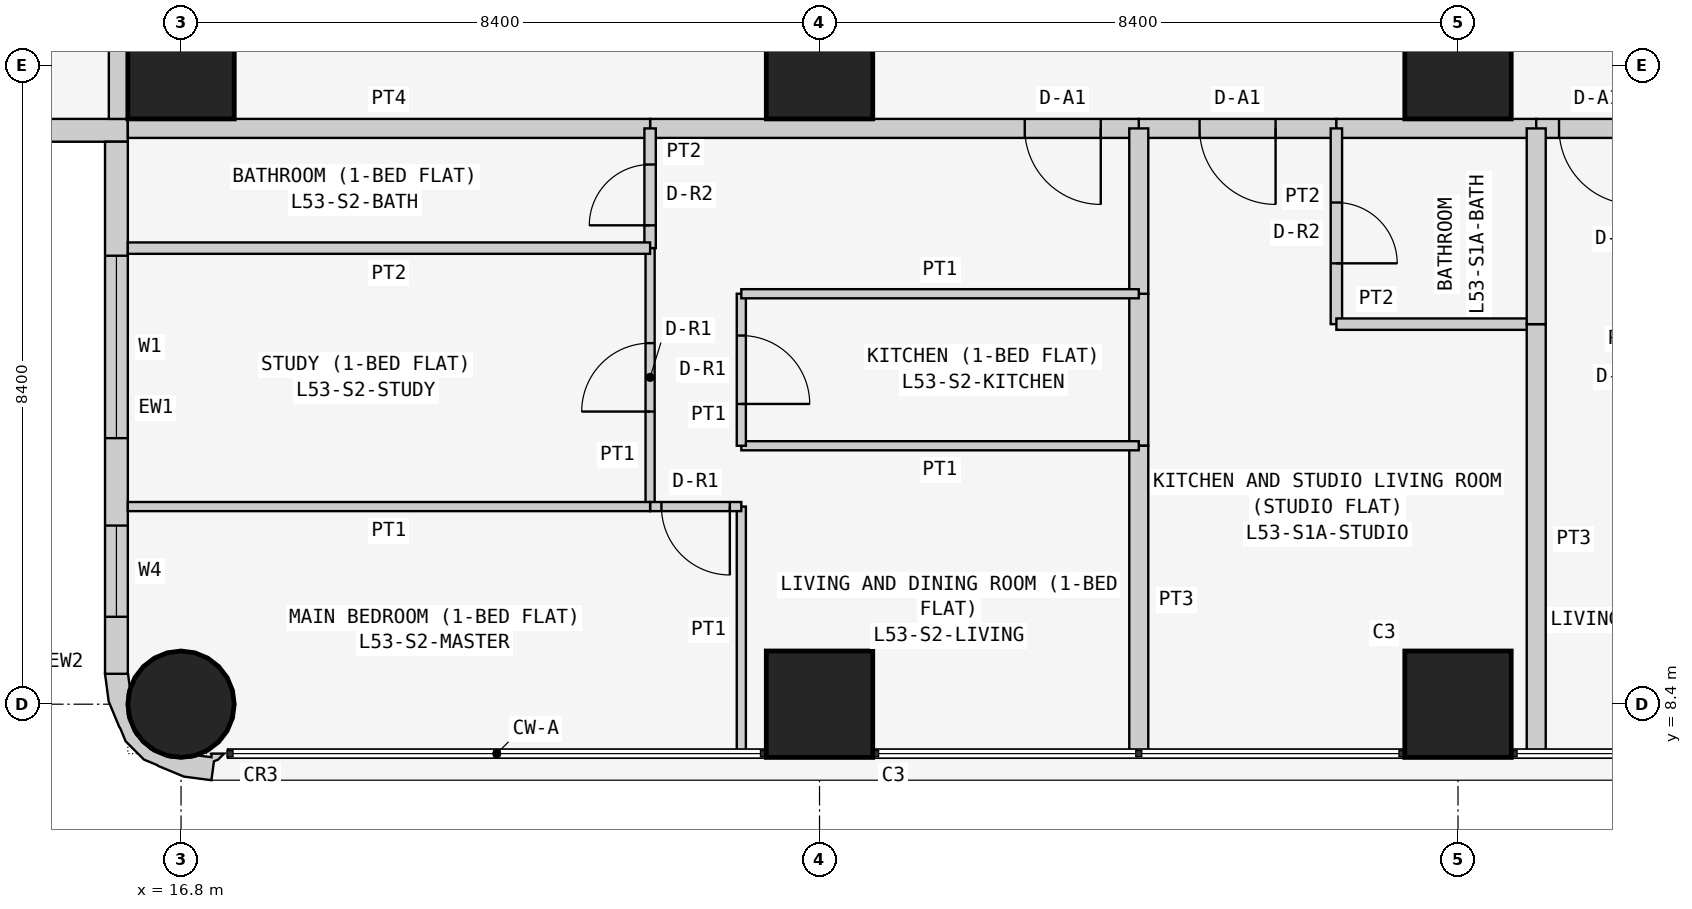
"""IFC4 building model, lengths in metres.
Left out: names, types, materials, properties, quantities, classifications, styles, units other than length and angle.
Written with IfcOpenShell. Run it as: python <this file> out.ifc"""

import sys

from ifc_helpers import new_model, si_unit, direction, frame, frame_2d, origin, origin_2d, place, context, subcontext, project, spatial, polyline, rectangle, circle, outline, extrude, element, fill, save


model = new_model("IFC4")
c1 = context("Model", 3, precision=1e-05, world=origin(), true_north=direction((0.0, 1.0)))
c2 = subcontext(c1, "Body", "Model", "MODEL_VIEW")
j1 = project(units=[si_unit("LENGTHUNIT", "METRE"), si_unit("PLANEANGLEUNIT", "RADIAN")], contexts=[c1])
p1 = place(None, origin())
s1 = spatial("IfcSite", under=j1, at=p1, CompositionType="ELEMENT")
p2 = place(p1, origin())
s2 = spatial("IfcBuilding", under=s1, at=p2, CompositionType="ELEMENT")
p3 = place(p2, frame((0.0, 0.0, 204.9)))
s3 = spatial("IfcBuildingStorey", under=s2, at=p3, CompositionType="ELEMENT", Elevation=204.9)
p4 = place(p3, frame((16.8, 8.4, 0.0), z_axis=(0.0, 0.0, 1.0), x_axis=(1.0, 0.0, 0.0)))
e1 = element("IfcColumn", 1, at=p4, inside=s3, PredefinedType="COLUMN", context=c2, shape_type="SweptSolid", body=[
    extrude(circle(Radius=0.7, at=origin_2d()), origin(), (0.0, 0.0, 1.0), 3.6),
])
for number, where, z_axis, x_axis in (
    (2, (16.8, 16.8, 0.0), (0.0, 0.0, 1.0), (1.0, 0.0, 0.0)),
    (3, (25.2, 8.4, 0.0), (0.0, 0.0, 1.0), (1.0, 0.0, 0.0)),
    (4, (25.2, 16.8, 0.0), (0.0, 0.0, 1.0), (1.0, 0.0, 0.0)),
    (5, (33.6, 8.4, 0.0), (0.0, 0.0, 1.0), (1.0, 0.0, 0.0)),
    (6, (33.6, 16.8, 0.0), (0.0, 0.0, 1.0), (1.0, 0.0, 0.0)),
):
    element("IfcColumn", number, at=place(p3, frame(where, z_axis=z_axis, x_axis=x_axis)), inside=s3, PredefinedType="COLUMN", context=c2, shape_type="SweptSolid", body=[
        extrude(rectangle(XDim=1.4, YDim=1.4, at=origin_2d()), origin(), (0.0, 0.0, 1.0), 3.6),
    ])
p5 = place(p3, frame((0.4, 15.95, 0.0), z_axis=(0.0, 0.0, 1.0), x_axis=(1.0, 0.0, 0.0)))
e7 = element("IfcWall", 7, at=p5, inside=s3, PredefinedType="SOLIDWALL", context=c2, shape_type="SweptSolid", body=[
    extrude(rectangle(XDim=15.7, YDim=0.3, at=frame_2d((7.85, 0.0))), origin(), (0.0, 0.0, 1.0), 3.45),
])
p6 = place(p5, frame((12.4, 0.0, 0.9)))
e8 = element("IfcOpeningElement", 8, at=p6, cuts=e7, PredefinedType="OPENING", context=c2, shape_type="SweptSolid", body=[
    extrude(rectangle(XDim=1.8, YDim=1.5, at=frame_2d((0.9, 0.75))), frame((0.0, 0.16, 0.0), z_axis=(0.0, -1.0, 0.0), x_axis=(1.0, 0.0, 0.0)), (0.0, 0.0, 1.0), 0.32),
])
p7 = place(p5, frame((9.55, 0.0, 1.5)))
e9 = element("IfcOpeningElement", 9, at=p7, cuts=e7, PredefinedType="OPENING", context=c2, shape_type="SweptSolid", body=[
    extrude(rectangle(XDim=0.9, YDim=0.7, at=frame_2d((0.45, 0.35))), frame((0.0, 0.16, 0.0), z_axis=(0.0, -1.0, 0.0), x_axis=(1.0, 0.0, 0.0)), (0.0, 0.0, 1.0), 0.32),
])
p8 = place(p5, frame((5.1, 0.0, 0.9)))
e10 = element("IfcOpeningElement", 10, at=p8, cuts=e7, PredefinedType="OPENING", context=c2, shape_type="SweptSolid", body=[
    extrude(rectangle(XDim=1.8, YDim=1.5, at=frame_2d((0.9, 0.75))), frame((0.0, 0.16, 0.0), z_axis=(0.0, -1.0, 0.0), x_axis=(1.0, 0.0, 0.0)), (0.0, 0.0, 1.0), 0.32),
])
p9 = place(p5, frame((2.0, 0.0, 0.0)))
e11 = element("IfcOpeningElement", 11, at=p9, cuts=e7, PredefinedType="OPENING", context=c2, shape_type="SweptSolid", body=[
    extrude(rectangle(XDim=0.9, YDim=2.4, at=frame_2d((0.45, 1.2))), frame((0.0, 0.16, 0.0), z_axis=(0.0, -1.0, 0.0), x_axis=(1.0, 0.0, 0.0)), (0.0, 0.0, 1.0), 0.32),
])
p10 = place(p5, frame((0.7, 0.0, 0.9)))
e12 = element("IfcOpeningElement", 12, at=p10, cuts=e7, PredefinedType="OPENING", context=c2, shape_type="SweptSolid", body=[
    extrude(rectangle(XDim=1.2, YDim=1.5, at=frame_2d((0.6, 0.75))), frame((0.0, 0.16, 0.0), z_axis=(0.0, -1.0, 0.0), x_axis=(1.0, 0.0, 0.0)), (0.0, 0.0, 1.0), 0.32),
])
p11 = place(p3, frame((15.95, 15.8, 0.0), z_axis=(0.0, 0.0, 1.0), x_axis=(0.0, -1.0, 0.0)))
e13 = element("IfcWall", 13, at=p11, inside=s3, PredefinedType="SOLIDWALL", context=c2, shape_type="SweptSolid", body=[
    extrude(rectangle(XDim=7.0, YDim=0.3, at=frame_2d((3.5, 0.0))), origin(), (0.0, 0.0, 1.0), 3.45),
])
p12 = place(p11, frame((1.5, 0.0, 0.9)))
e14 = element("IfcOpeningElement", 14, at=p12, cuts=e13, PredefinedType="OPENING", context=c2, shape_type="SweptSolid", body=[
    extrude(rectangle(XDim=2.4, YDim=1.5, at=frame_2d((1.2, 0.75))), frame((0.0, 0.16, 0.0), z_axis=(0.0, -1.0, 0.0), x_axis=(1.0, 0.0, 0.0)), (0.0, 0.0, 1.0), 0.32),
])
p13 = place(p11, frame((5.05, 0.0, 0.9)))
e15 = element("IfcOpeningElement", 15, at=p13, cuts=e13, PredefinedType="OPENING", context=c2, shape_type="SweptSolid", body=[
    extrude(rectangle(XDim=1.2, YDim=1.5, at=frame_2d((0.6, 0.75))), frame((0.0, 0.16, 0.0), z_axis=(0.0, -1.0, 0.0), x_axis=(1.0, 0.0, 0.0)), (0.0, 0.0, 1.0), 0.32),
])
p14 = place(p3, frame((16.076, 8.69, 0.0), z_axis=(0.0, 0.0, 1.0), x_axis=(-0.439933741929, -0.898030234854, 0.0)))
e16 = element("IfcWall", 16, at=p14, inside=s3, PredefinedType="SOLIDWALL", context=c2, shape_type="SweptSolid", body=[
    extrude(outline(polyline([(0.664, 1.577), (0.426, 1.497), (0.382, 1.536), (0.276, 1.572), (0.349, 1.423), (0.392, 1.444), (0.453, 1.261), (0.51, 1.211), (0.632, 0.961), (0.65, 0.683), (0.56, 0.419), (0.375, 0.21), (0.125, 0.087), (0.05, 0.082), (-0.127, -0.035), (-0.145, -0.044), (0.022, -0.296), (0.327, -0.094), (0.568, 0.18), (0.578, 0.199), (0.7, 0.337), (0.811, 0.661), (0.799, 0.846), (0.803, 0.866), (0.78, 1.231), (0.664, 1.577)])), origin(), (0.0, 0.0, 1.0), 3.45),
])
p15 = place(p3, frame((32.0, 15.975, 0.0), z_axis=(0.0, 0.0, 1.0), x_axis=(-1.0, 0.0, 0.0)))
e17 = element("IfcWall", 17, at=p15, inside=s3, PredefinedType="PARTITIONING", context=c2, shape_type="SweptSolid", body=[
    extrude(rectangle(XDim=2.6, YDim=0.25, at=frame_2d((1.3, 0.0))), origin(), (0.0, 0.0, 1.0), 3.45),
])
p16 = place(p15, frame((0.8, 0.0, 0.0)))
e18 = element("IfcOpeningElement", 18, at=p16, cuts=e17, PredefinedType="OPENING", context=c2, shape_type="SweptSolid", body=[
    extrude(rectangle(XDim=1.0, YDim=2.1, at=frame_2d((0.5, 1.05))), frame((0.0, 0.135, 0.0), z_axis=(0.0, -1.0, 0.0), x_axis=(1.0, 0.0, 0.0)), (0.0, 0.0, 1.0), 0.27),
])
p17 = place(p3, frame((34.629, 15.975, 0.0), z_axis=(0.0, 0.0, 1.0), x_axis=(-1.0, 0.0, 0.0)))
e19 = element("IfcWall", 19, at=p17, inside=s3, PredefinedType="PARTITIONING", context=c2, shape_type="SweptSolid", body=[
    extrude(rectangle(XDim=2.629, YDim=0.25, at=frame_2d((1.314, 0.0))), origin(), (0.0, 0.0, 1.0), 3.45),
])
p18 = place(p3, frame((36.229, 15.975, 0.0), z_axis=(0.0, 0.0, 1.0), x_axis=(-1.0, 0.0, 0.0)))
e20 = element("IfcWall", 20, at=p18, inside=s3, PredefinedType="PARTITIONING", context=c2, shape_type="SweptSolid", body=[
    extrude(rectangle(XDim=1.6, YDim=0.25, at=frame_2d((0.8, 0.0))), origin(), (0.0, 0.0, 1.0), 3.45),
])
p19 = place(p18, frame((0.3, 0.0, 0.0)))
e21 = element("IfcOpeningElement", 21, at=p19, cuts=e20, PredefinedType="OPENING", context=c2, shape_type="SweptSolid", body=[
    extrude(rectangle(XDim=1.0, YDim=2.1, at=frame_2d((0.5, 1.05))), frame((0.0, 0.135, 0.0), z_axis=(0.0, -1.0, 0.0), x_axis=(1.0, 0.0, 0.0)), (0.0, 0.0, 1.0), 0.27),
])
p20 = place(p3, frame((29.4, 15.975, 0.0), z_axis=(0.0, 0.0, 1.0), x_axis=(-1.0, 0.0, 0.0)))
e22 = element("IfcWall", 22, at=p20, inside=s3, PredefinedType="PARTITIONING", context=c2, shape_type="SweptSolid", body=[
    extrude(rectangle(XDim=6.429, YDim=0.25, at=frame_2d((3.214, 0.0))), origin(), (0.0, 0.0, 1.0), 3.45),
])
p21 = place(p20, frame((0.5, 0.0, 0.0)))
e23 = element("IfcOpeningElement", 23, at=p21, cuts=e22, PredefinedType="OPENING", context=c2, shape_type="SweptSolid", body=[
    extrude(rectangle(XDim=1.0, YDim=2.1, at=frame_2d((0.5, 1.05))), frame((0.0, 0.135, 0.0), z_axis=(0.0, -1.0, 0.0), x_axis=(1.0, 0.0, 0.0)), (0.0, 0.0, 1.0), 0.27),
])
for number, where, z_axis, x_axis in (
    (24, (22.971, 15.975, 0.0), (0.0, 0.0, 1.0), (-1.0, 0.0, 0.0)),
    (25, (15.975, 16.1, 0.0), (0.0, 0.0, 1.0), (0.0, 1.0, 0.0)),
):
    element("IfcWall", number, at=place(p3, frame(where, z_axis=z_axis, x_axis=x_axis)), inside=s3, PredefinedType="PARTITIONING", context=c2, shape_type="SweptSolid", body=[
        extrude(rectangle(XDim=6.871, YDim=0.25, at=frame_2d((3.436, 0.0))), origin(), (0.0, 0.0, 1.0), 3.45),
    ])
p22 = place(p3, frame((32.0, 15.975, 0.0), z_axis=(0.0, 0.0, 1.0), x_axis=(0.0, -1.0, 0.0)))
e26 = element("IfcWall", 26, at=p22, inside=s3, PredefinedType="PARTITIONING", context=c2, shape_type="SweptSolid", body=[
    extrude(rectangle(XDim=2.575, YDim=0.15, at=frame_2d((1.288, 0.0))), origin(), (0.0, 0.0, 1.0), 3.45),
])
p23 = place(p22, frame((0.975, 0.0, 0.0)))
e27 = element("IfcOpeningElement", 27, at=p23, cuts=e26, PredefinedType="OPENING", context=c2, shape_type="SweptSolid", body=[
    extrude(rectangle(XDim=0.8, YDim=2.1, at=frame_2d((0.4, 1.05))), frame((0.0, 0.085, 0.0), z_axis=(0.0, -1.0, 0.0), x_axis=(1.0, 0.0, 0.0)), (0.0, 0.0, 1.0), 0.17),
])
p24 = place(p3, frame((32.0, 13.4, 0.0), z_axis=(0.0, 0.0, 1.0), x_axis=(1.0, 0.0, 0.0)))
e28 = element("IfcWall", 28, at=p24, inside=s3, PredefinedType="PARTITIONING", context=c2, shape_type="SweptSolid", body=[
    extrude(rectangle(XDim=2.629, YDim=0.15, at=frame_2d((1.314, 0.0))), origin(), (0.0, 0.0, 1.0), 3.45),
])
p25 = place(p3, frame((34.629, 13.4, 0.0), z_axis=(0.0, 0.0, 1.0), x_axis=(0.0, -1.0, 0.0)))
e29 = element("IfcWall", 29, at=p25, inside=s3, PredefinedType="PARTITIONING", context=c2, shape_type="SweptSolid", body=[
    extrude(rectangle(XDim=5.65, YDim=0.25, at=frame_2d((2.825, 0.0))), origin(), (0.0, 0.0, 1.0), 3.45),
])
p26 = place(p3, frame((29.4, 11.8, 0.0), z_axis=(0.0, 0.0, 1.0), x_axis=(0.0, 1.0, 0.0)))
e30 = element("IfcWall", 30, at=p26, inside=s3, PredefinedType="PARTITIONING", context=c2, shape_type="SweptSolid", body=[
    extrude(rectangle(XDim=2.0, YDim=0.25, at=frame_2d((1.0, 0.0))), origin(), (0.0, 0.0, 1.0), 2.848),
])
p27 = place(p3, frame((29.4, 7.75, 0.0), z_axis=(0.0, 0.0, 1.0), x_axis=(0.0, 1.0, 0.0)))
e31 = element("IfcWall", 31, at=p27, inside=s3, PredefinedType="PARTITIONING", context=c2, shape_type="SweptSolid", body=[
    extrude(rectangle(XDim=4.05, YDim=0.25, at=frame_2d((2.025, 0.0))), origin(), (0.0, 0.0, 1.0), 2.848),
])
p28 = place(p3, frame((29.4, 13.8, 0.0), z_axis=(0.0, 0.0, 1.0), x_axis=(0.0, 1.0, 0.0)))
e32 = element("IfcWall", 32, at=p28, inside=s3, PredefinedType="PARTITIONING", context=c2, shape_type="SweptSolid", body=[
    extrude(rectangle(XDim=2.175, YDim=0.25, at=frame_2d((1.087, 0.0))), origin(), (0.0, 0.0, 1.0), 2.848),
])
p29 = place(p3, frame((34.629, 13.4, 0.0), z_axis=(0.0, 0.0, 1.0), x_axis=(0.0, 1.0, 0.0)))
e33 = element("IfcWall", 33, at=p29, inside=s3, PredefinedType="PARTITIONING", context=c2, shape_type="SweptSolid", body=[
    extrude(rectangle(XDim=2.575, YDim=0.25, at=frame_2d((1.288, 0.0))), origin(), (0.0, 0.0, 1.0), 3.45),
])
p30 = place(p3, frame((29.4, 11.8, 0.0), z_axis=(0.0, 0.0, 1.0), x_axis=(-1.0, 0.0, 0.0)))
e34 = element("IfcWall", 34, at=p30, inside=s3, PredefinedType="PARTITIONING", context=c2, shape_type="SweptSolid", body=[
    extrude(rectangle(XDim=5.229, YDim=0.12, at=frame_2d((2.615, 0.0))), origin(), (0.0, 0.0, 1.0), 3.45),
])
p31 = place(p3, frame((24.171, 11.8, 0.0), z_axis=(0.0, 0.0, 1.0), x_axis=(0.0, 1.0, 0.0)))
e35 = element("IfcWall", 35, at=p31, inside=s3, PredefinedType="PARTITIONING", context=c2, shape_type="SweptSolid", body=[
    extrude(rectangle(XDim=2.0, YDim=0.12, at=frame_2d((1.0, 0.0))), origin(), (0.0, 0.0, 1.0), 3.45),
])
p32 = place(p31, frame((0.55, 0.0, 0.0)))
e36 = element("IfcOpeningElement", 36, at=p32, cuts=e35, PredefinedType="OPENING", context=c2, shape_type="SweptSolid", body=[
    extrude(rectangle(XDim=0.9, YDim=2.1, at=frame_2d((0.45, 1.05))), frame((0.0, 0.07, 0.0), z_axis=(0.0, -1.0, 0.0), x_axis=(1.0, 0.0, 0.0)), (0.0, 0.0, 1.0), 0.14),
])
p33 = place(p3, frame((24.171, 13.8, 0.0), z_axis=(0.0, 0.0, 1.0), x_axis=(1.0, 0.0, 0.0)))
e37 = element("IfcWall", 37, at=p33, inside=s3, PredefinedType="PARTITIONING", context=c2, shape_type="SweptSolid", body=[
    extrude(rectangle(XDim=5.229, YDim=0.12, at=frame_2d((2.615, 0.0))), origin(), (0.0, 0.0, 1.0), 3.45),
])
p34 = place(p3, frame((22.971, 14.4, 0.0), z_axis=(0.0, 0.0, 1.0), x_axis=(0.0, 1.0, 0.0)))
e38 = element("IfcWall", 38, at=p34, inside=s3, PredefinedType="PARTITIONING", context=c2, shape_type="SweptSolid", body=[
    extrude(rectangle(XDim=1.575, YDim=0.15, at=frame_2d((0.788, 0.0))), origin(), (0.0, 0.0, 1.0), 3.45),
])
p35 = place(p34, frame((0.3, 0.0, 0.0)))
e39 = element("IfcOpeningElement", 39, at=p35, cuts=e38, PredefinedType="OPENING", context=c2, shape_type="SweptSolid", body=[
    extrude(rectangle(XDim=0.8, YDim=2.1, at=frame_2d((0.4, 1.05))), frame((0.0, 0.085, 0.0), z_axis=(0.0, -1.0, 0.0), x_axis=(1.0, 0.0, 0.0)), (0.0, 0.0, 1.0), 0.17),
])
p36 = place(p3, frame((22.971, 11.0, 0.0), z_axis=(0.0, 0.0, 1.0), x_axis=(0.0, 1.0, 0.0)))
e40 = element("IfcWall", 40, at=p36, inside=s3, PredefinedType="PARTITIONING", context=c2, shape_type="SweptSolid", body=[
    extrude(rectangle(XDim=3.4, YDim=0.12, at=frame_2d((1.7, 0.0))), origin(), (0.0, 0.0, 1.0), 3.45),
])
p37 = place(p36, frame((1.25, 0.0, 0.0)))
e41 = element("IfcOpeningElement", 41, at=p37, cuts=e40, PredefinedType="OPENING", context=c2, shape_type="SweptSolid", body=[
    extrude(rectangle(XDim=0.9, YDim=2.1, at=frame_2d((0.45, 1.05))), frame((0.0, 0.07, 0.0), z_axis=(0.0, -1.0, 0.0), x_axis=(1.0, 0.0, 0.0)), (0.0, 0.0, 1.0), 0.14),
])
p38 = place(p3, frame((24.171, 7.75, 0.0), z_axis=(0.0, 0.0, 1.0), x_axis=(0.0, 1.0, 0.0)))
e42 = element("IfcWall", 42, at=p38, inside=s3, PredefinedType="PARTITIONING", context=c2, shape_type="SweptSolid", body=[
    extrude(rectangle(XDim=3.25, YDim=0.12, at=frame_2d((1.625, 0.0))), origin(), (0.0, 0.0, 1.0), 3.45),
])
p39 = place(p3, frame((24.171, 11.0, 0.0), z_axis=(0.0, 0.0, 1.0), x_axis=(-1.0, 0.0, 0.0)))
e43 = element("IfcWall", 43, at=p39, inside=s3, PredefinedType="PARTITIONING", context=c2, shape_type="SweptSolid", body=[
    extrude(rectangle(XDim=1.2, YDim=0.12, at=frame_2d((0.6, 0.0))), origin(), (0.0, 0.0, 1.0), 3.45),
])
p40 = place(p39, frame((0.151, 0.0, 0.0)))
e44 = element("IfcOpeningElement", 44, at=p40, cuts=e43, PredefinedType="OPENING", context=c2, shape_type="SweptSolid", body=[
    extrude(rectangle(XDim=0.9, YDim=2.1, at=frame_2d((0.45, 1.05))), frame((0.0, 0.07, 0.0), z_axis=(0.0, -1.0, 0.0), x_axis=(1.0, 0.0, 0.0)), (0.0, 0.0, 1.0), 0.14),
])
p41 = place(p3, frame((22.971, 14.4, 0.0), z_axis=(0.0, 0.0, 1.0), x_axis=(-1.0, 0.0, 0.0)))
e45 = element("IfcWall", 45, at=p41, inside=s3, PredefinedType="PARTITIONING", context=c2, shape_type="SweptSolid", body=[
    extrude(rectangle(XDim=6.871, YDim=0.15, at=frame_2d((3.436, 0.0))), origin(), (0.0, 0.0, 1.0), 3.45),
])
p42 = place(p3, frame((22.971, 11.0, 0.0), z_axis=(0.0, 0.0, 1.0), x_axis=(-1.0, 0.0, 0.0)))
e46 = element("IfcWall", 46, at=p42, inside=s3, PredefinedType="PARTITIONING", context=c2, shape_type="SweptSolid", body=[
    extrude(rectangle(XDim=6.871, YDim=0.12, at=frame_2d((3.436, 0.0))), origin(), (0.0, 0.0, 1.0), 3.45),
])
p43 = place(p12, origin())
e47 = element("IfcWindow", 47, at=p43, inside=s3, PartitioningType="SINGLE_PANEL", PredefinedType="WINDOW", context=c2, shape_type="SweptSolid", body=[
    extrude(rectangle(XDim=2.4, YDim=1.5, at=frame_2d((1.2, 0.75))), frame((0.0, 0.03, 0.0), z_axis=(0.0, -1.0, 0.0), x_axis=(1.0, 0.0, 0.0)), (0.0, 0.0, 1.0), 0.06),
])
fill(e14, e47)
p44 = place(p13, origin())
e48 = element("IfcWindow", 48, at=p44, inside=s3, PartitioningType="SINGLE_PANEL", PredefinedType="WINDOW", context=c2, shape_type="SweptSolid", body=[
    extrude(rectangle(XDim=1.2, YDim=1.5, at=frame_2d((0.6, 0.75))), frame((0.0, 0.03, 0.0), z_axis=(0.0, -1.0, 0.0), x_axis=(1.0, 0.0, 0.0)), (0.0, 0.0, 1.0), 0.06),
])
fill(e15, e48)
p45 = place(p16, origin())
e49 = element("IfcDoor", 49, at=p45, inside=s3, OperationType="SINGLE_SWING_LEFT", PredefinedType="DOOR", context=c2, shape_type="SweptSolid", body=[
    extrude(rectangle(XDim=1.0, YDim=2.1, at=frame_2d((0.5, 1.05))), frame((0.0, 0.025, 0.0), z_axis=(0.0, -1.0, 0.0), x_axis=(1.0, 0.0, 0.0)), (0.0, 0.0, 1.0), 0.05),
])
fill(e18, e49)
p46 = place(p23, origin())
e50 = element("IfcDoor", 50, at=p46, inside=s3, OperationType="SINGLE_SWING_RIGHT", PredefinedType="DOOR", context=c2, shape_type="SweptSolid", body=[
    extrude(rectangle(XDim=0.8, YDim=2.1, at=frame_2d((0.4, 1.05))), frame((0.0, 0.025, 0.0), z_axis=(0.0, -1.0, 0.0), x_axis=(1.0, 0.0, 0.0)), (0.0, 0.0, 1.0), 0.05),
])
fill(e27, e50)
p47 = place(p19, origin())
e51 = element("IfcDoor", 51, at=p47, inside=s3, OperationType="SINGLE_SWING_LEFT", PredefinedType="DOOR", context=c2, shape_type="SweptSolid", body=[
    extrude(rectangle(XDim=1.0, YDim=2.1, at=frame_2d((0.5, 1.05))), frame((0.0, 0.025, 0.0), z_axis=(0.0, -1.0, 0.0), x_axis=(1.0, 0.0, 0.0)), (0.0, 0.0, 1.0), 0.05),
])
fill(e21, e51)
p48 = place(p21, origin())
e52 = element("IfcDoor", 52, at=p48, inside=s3, OperationType="SINGLE_SWING_LEFT", PredefinedType="DOOR", context=c2, shape_type="SweptSolid", body=[
    extrude(rectangle(XDim=1.0, YDim=2.1, at=frame_2d((0.5, 1.05))), frame((0.0, 0.025, 0.0), z_axis=(0.0, -1.0, 0.0), x_axis=(1.0, 0.0, 0.0)), (0.0, 0.0, 1.0), 0.05),
])
fill(e23, e52)
p49 = place(p32, frame((0.9, 0.0, 0.0), z_axis=(0.0, 0.0, 1.0), x_axis=(-1.0, 0.0, 0.0)))
e53 = element("IfcDoor", 53, at=p49, inside=s3, OperationType="SINGLE_SWING_RIGHT", PredefinedType="DOOR", context=c2, shape_type="SweptSolid", body=[
    extrude(rectangle(XDim=0.9, YDim=2.1, at=frame_2d((0.45, 1.05))), frame((0.0, 0.025, 0.0), z_axis=(0.0, -1.0, 0.0), x_axis=(1.0, 0.0, 0.0)), (0.0, 0.0, 1.0), 0.05),
])
fill(e36, e53)
p50 = place(p35, origin())
e54 = element("IfcDoor", 54, at=p50, inside=s3, OperationType="SINGLE_SWING_LEFT", PredefinedType="DOOR", context=c2, shape_type="SweptSolid", body=[
    extrude(rectangle(XDim=0.8, YDim=2.1, at=frame_2d((0.4, 1.05))), frame((0.0, 0.025, 0.0), z_axis=(0.0, -1.0, 0.0), x_axis=(1.0, 0.0, 0.0)), (0.0, 0.0, 1.0), 0.05),
])
fill(e39, e54)
p51 = place(p37, origin())
e55 = element("IfcDoor", 55, at=p51, inside=s3, OperationType="SINGLE_SWING_LEFT", PredefinedType="DOOR", context=c2, shape_type="SweptSolid", body=[
    extrude(rectangle(XDim=0.9, YDim=2.1, at=frame_2d((0.45, 1.05))), frame((0.0, 0.025, 0.0), z_axis=(0.0, -1.0, 0.0), x_axis=(1.0, 0.0, 0.0)), (0.0, 0.0, 1.0), 0.05),
])
fill(e41, e55)
p52 = place(p40, origin())
e56 = element("IfcDoor", 56, at=p52, inside=s3, OperationType="SINGLE_SWING_LEFT", PredefinedType="DOOR", context=c2, shape_type="SweptSolid", body=[
    extrude(rectangle(XDim=0.9, YDim=2.1, at=frame_2d((0.45, 1.05))), frame((0.0, 0.025, 0.0), z_axis=(0.0, -1.0, 0.0), x_axis=(1.0, 0.0, 0.0)), (0.0, 0.0, 1.0), 0.05),
])
fill(e44, e56)
save(model, sys.argv[1])
